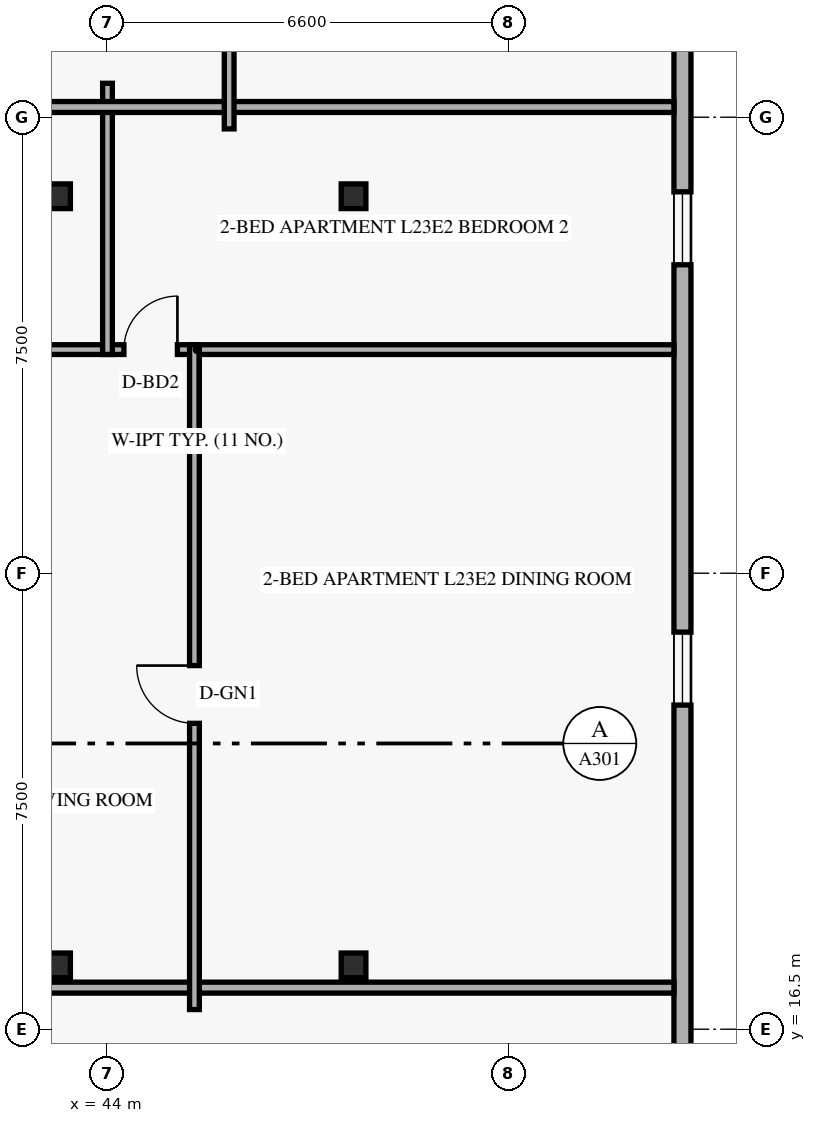
"""IFC4 building model, lengths in metres.
Left out: names, types, materials, properties, quantities, classifications, styles, units other than length and angle.
Written with IfcOpenShell. Run it as: python <this file> out.ifc"""

import sys

from ifc_helpers import new_model, si_unit, direction, frame, frame_2d, origin, origin_2d, place, context, subcontext, project, spatial, rectangle, hollow_rectangle, extrude, element, fill, save


model = new_model("IFC4")
c1 = context("Model", 3, precision=1e-05, world=origin(), true_north=direction((0.0, 1.0)))
c2 = subcontext(c1, "Body", "Model", "MODEL_VIEW")
j1 = project(units=[si_unit("LENGTHUNIT", "METRE"), si_unit("PLANEANGLEUNIT", "RADIAN")], contexts=[c1])
p1 = place(None, origin())
s1 = spatial("IfcSite", under=j1, at=p1, CompositionType="ELEMENT")
p2 = place(p1, origin())
s2 = spatial("IfcBuilding", under=s1, at=p2, CompositionType="ELEMENT")
p3 = place(p2, frame((0.0, 0.0, 91.2)))
s3 = spatial("IfcBuildingStorey", under=s2, at=p3, CompositionType="ELEMENT", Elevation=91.2)
for number, where, z_axis, x_axis in (
    (1, (43.128, 17.55, 0.0), (0.035, 0.0, 0.999), (0.0, 1.0, 0.0)),
    (2, (43.128, 30.2, 0.0), (0.035, 0.0, 0.999), (0.0, 1.0, 0.0)),
):
    element("IfcColumn", number, at=place(p3, frame(where, z_axis=z_axis, x_axis=x_axis)), inside=s3, PredefinedType="COLUMN", context=c2, shape_type="SweptSolid", body=[
        extrude(hollow_rectangle(XDim=0.406, YDim=0.406, WallThickness=0.016, at=origin_2d()), origin(), (0.0, 0.0, 1.0), 3.602),
    ])
for number, where, z_axis, x_axis in (
    (3, (47.946, 17.55, 0.0), (0.058, 0.0, 0.998), (0.0, 1.0, 0.0)),
    (4, (47.946, 30.2, 0.0), (0.058, 0.0, 0.998), (0.0, 1.0, 0.0)),
):
    element("IfcColumn", number, at=place(p3, frame(where, z_axis=z_axis, x_axis=x_axis)), inside=s3, PredefinedType="COLUMN", context=c2, shape_type="SweptSolid", body=[
        extrude(hollow_rectangle(XDim=0.406, YDim=0.406, WallThickness=0.016, at=origin_2d()), origin(), (0.0, 0.0, 1.0), 3.606),
    ])
p4 = place(p3, frame((53.46, 6.32, 0.0), z_axis=(0.0, 0.0, 1.0), x_axis=(0.0, 1.0, 0.0)))
e5 = element("IfcWall", 5, at=p4, inside=s3, PredefinedType="SOLIDWALL", context=c2, shape_type="SweptSolid", body=[
    extrude(rectangle(XDim=35.36, YDim=0.28, at=frame_2d((17.68, 0.0))), origin(), (0.0, 0.0, 1.0), 3.36),
])
p5 = place(p4, frame((4.832, 0.0, 0.85)))
e6 = element("IfcOpeningElement", 6, at=p5, cuts=e5, PredefinedType="OPENING", context=c2, shape_type="SweptSolid", body=[
    extrude(rectangle(XDim=1.2, YDim=1.5, at=frame_2d((0.6, 0.75))), frame((0.0, 0.15, 0.0), z_axis=(0.0, -1.0, 0.0), x_axis=(1.0, 0.0, 0.0)), (0.0, 0.0, 1.0), 0.3),
])
p6 = place(p4, frame((15.511, 0.0, 0.85)))
e7 = element("IfcOpeningElement", 7, at=p6, cuts=e5, PredefinedType="OPENING", context=c2, shape_type="SweptSolid", body=[
    extrude(rectangle(XDim=1.2, YDim=1.5, at=frame_2d((0.6, 0.75))), frame((0.0, 0.15, 0.0), z_axis=(0.0, -1.0, 0.0), x_axis=(1.0, 0.0, 0.0)), (0.0, 0.0, 1.0), 0.3),
])
p7 = place(p4, frame((22.753, 0.0, 0.85)))
e8 = element("IfcOpeningElement", 8, at=p7, cuts=e5, PredefinedType="OPENING", context=c2, shape_type="SweptSolid", body=[
    extrude(rectangle(XDim=1.2, YDim=1.5, at=frame_2d((0.6, 0.75))), frame((0.0, 0.15, 0.0), z_axis=(0.0, -1.0, 0.0), x_axis=(1.0, 0.0, 0.0)), (0.0, 0.0, 1.0), 0.3),
])
p8 = place(p4, frame((29.754, 0.0, 0.85)))
e9 = element("IfcOpeningElement", 9, at=p8, cuts=e5, PredefinedType="OPENING", context=c2, shape_type="SweptSolid", body=[
    extrude(rectangle(XDim=1.2, YDim=1.5, at=frame_2d((0.6, 0.75))), frame((0.0, 0.15, 0.0), z_axis=(0.0, -1.0, 0.0), x_axis=(1.0, 0.0, 0.0)), (0.0, 0.0, 1.0), 0.3),
])
p9 = place(p3, frame((37.64, 17.184, 0.0), z_axis=(0.0, 0.0, 1.0), x_axis=(1.0, 0.0, 0.0)))
e10 = element("IfcWall", 10, at=p9, inside=s3, PredefinedType="PARTITIONING", context=c2, shape_type="SweptSolid", body=[
    extrude(rectangle(XDim=15.68, YDim=0.18, at=frame_2d((7.84, 0.0))), origin(), (0.0, 0.0, 1.0), 2.731),
])
p10 = place(p3, frame((37.64, 27.678, 0.0), z_axis=(0.0, 0.0, 1.0), x_axis=(1.0, 0.0, 0.0)))
e11 = element("IfcWall", 11, at=p10, inside=s3, PredefinedType="PARTITIONING", context=c2, shape_type="SweptSolid", body=[
    extrude(rectangle(XDim=15.68, YDim=0.16, at=frame_2d((7.84, 0.0))), origin(), (0.0, 0.0, 1.0), 2.731),
])
p11 = place(p10, frame((4.103, 0.0, 0.0)))
e12 = element("IfcOpeningElement", 12, at=p11, cuts=e11, PredefinedType="OPENING", context=c2, shape_type="SweptSolid", body=[
    extrude(rectangle(XDim=0.88, YDim=2.14, at=frame_2d((0.44, 1.07))), frame((0.0, 0.09, 0.0), z_axis=(0.0, -1.0, 0.0), x_axis=(1.0, 0.0, 0.0)), (0.0, 0.0, 1.0), 0.18),
])
p12 = place(p10, frame((6.634, 0.0, 0.0)))
e13 = element("IfcOpeningElement", 13, at=p12, cuts=e11, PredefinedType="OPENING", context=c2, shape_type="SweptSolid", body=[
    extrude(rectangle(XDim=0.88, YDim=2.14, at=frame_2d((0.44, 1.07))), frame((0.0, 0.09, 0.0), z_axis=(0.0, -1.0, 0.0), x_axis=(1.0, 0.0, 0.0)), (0.0, 0.0, 1.0), 0.18),
])
p13 = place(p3, frame((45.434, 16.824, 0.0), z_axis=(0.0, 0.0, 1.0), x_axis=(0.0, 1.0, 0.0)))
e14 = element("IfcWall", 14, at=p13, inside=s3, PredefinedType="PARTITIONING", context=c2, shape_type="SweptSolid", body=[
    extrude(rectangle(XDim=10.934, YDim=0.16, at=frame_2d((5.467, 0.0))), origin(), (0.0, 0.0, 1.0), 2.731),
])
p14 = place(p13, frame((4.707, 0.0, 0.0)))
e15 = element("IfcOpeningElement", 15, at=p14, cuts=e14, PredefinedType="OPENING", context=c2, shape_type="SweptSolid", body=[
    extrude(rectangle(XDim=0.95, YDim=2.15, at=frame_2d((0.475, 1.075))), frame((0.0, 0.09, 0.0), z_axis=(0.0, -1.0, 0.0), x_axis=(1.0, 0.0, 0.0)), (0.0, 0.0, 1.0), 0.18),
])
p15 = place(p3, frame((44.004, 27.598, 0.0), z_axis=(0.0, 0.0, 1.0), x_axis=(0.0, 1.0, 0.0)))
e16 = element("IfcWall", 16, at=p15, inside=s3, PredefinedType="PARTITIONING", context=c2, shape_type="SweptSolid", body=[
    extrude(rectangle(XDim=4.46, YDim=0.16, at=frame_2d((2.23, 0.0))), origin(), (0.0, 0.0, 1.0), 2.731),
])
p16 = place(p3, frame((37.64, 31.668, 0.0), z_axis=(0.0, 0.0, 1.0), x_axis=(1.0, 0.0, 0.0)))
e17 = element("IfcWall", 17, at=p16, inside=s3, PredefinedType="PARTITIONING", context=c2, shape_type="SweptSolid", body=[
    extrude(rectangle(XDim=15.68, YDim=0.18, at=frame_2d((7.84, 0.0))), origin(), (0.0, 0.0, 1.0), 2.731),
])
p17 = place(p3, frame((46.005, 31.308, 0.0), z_axis=(0.0, 0.0, 1.0), x_axis=(0.0, 1.0, 0.0)))
e18 = element("IfcWall", 18, at=p17, inside=s3, PredefinedType="PARTITIONING", context=c2, shape_type="SweptSolid", body=[
    extrude(rectangle(XDim=10.282, YDim=0.16, at=frame_2d((5.141, 0.0))), origin(), (0.0, 0.0, 1.0), 2.731),
])
p18 = place(p17, frame((4.381, 0.0, 0.0)))
e19 = element("IfcOpeningElement", 19, at=p18, cuts=e18, PredefinedType="OPENING", context=c2, shape_type="SweptSolid", body=[
    extrude(rectangle(XDim=0.95, YDim=2.15, at=frame_2d((0.475, 1.075))), frame((0.0, 0.09, 0.0), z_axis=(0.0, -1.0, 0.0), x_axis=(1.0, 0.0, 0.0)), (0.0, 0.0, 1.0), 0.18),
])
p19 = place(p6, origin())
e20 = element("IfcWindow", 20, at=p19, inside=s3, PartitioningType="SINGLE_PANEL", PredefinedType="WINDOW", context=c2, shape_type="SweptSolid", body=[
    extrude(rectangle(XDim=1.2, YDim=1.5, at=frame_2d((0.6, 0.75))), frame((0.0, 0.03, 0.0), z_axis=(0.0, -1.0, 0.0), x_axis=(1.0, 0.0, 0.0)), (0.0, 0.0, 1.0), 0.06),
])
fill(e7, e20)
p20 = place(p7, origin())
e21 = element("IfcWindow", 21, at=p20, inside=s3, PartitioningType="SINGLE_PANEL", PredefinedType="WINDOW", context=c2, shape_type="SweptSolid", body=[
    extrude(rectangle(XDim=1.2, YDim=1.5, at=frame_2d((0.6, 0.75))), frame((0.0, 0.03, 0.0), z_axis=(0.0, -1.0, 0.0), x_axis=(1.0, 0.0, 0.0)), (0.0, 0.0, 1.0), 0.06),
])
fill(e8, e21)
p21 = place(p14, origin())
e22 = element("IfcDoor", 22, at=p21, inside=s3, OperationType="SINGLE_SWING_RIGHT", PredefinedType="DOOR", context=c2, shape_type="SweptSolid", body=[
    extrude(rectangle(XDim=0.95, YDim=2.15, at=frame_2d((0.475, 1.075))), frame((0.0, 0.025, 0.0), z_axis=(0.0, -1.0, 0.0), x_axis=(1.0, 0.0, 0.0)), (0.0, 0.0, 1.0), 0.05),
])
fill(e15, e22)
p22 = place(p12, origin())
e23 = element("IfcDoor", 23, at=p22, inside=s3, OperationType="SINGLE_SWING_RIGHT", PredefinedType="DOOR", context=c2, shape_type="SweptSolid", body=[
    extrude(rectangle(XDim=0.88, YDim=2.14, at=frame_2d((0.44, 1.07))), frame((0.0, 0.025, 0.0), z_axis=(0.0, -1.0, 0.0), x_axis=(1.0, 0.0, 0.0)), (0.0, 0.0, 1.0), 0.05),
])
fill(e13, e23)
save(model, sys.argv[1])
